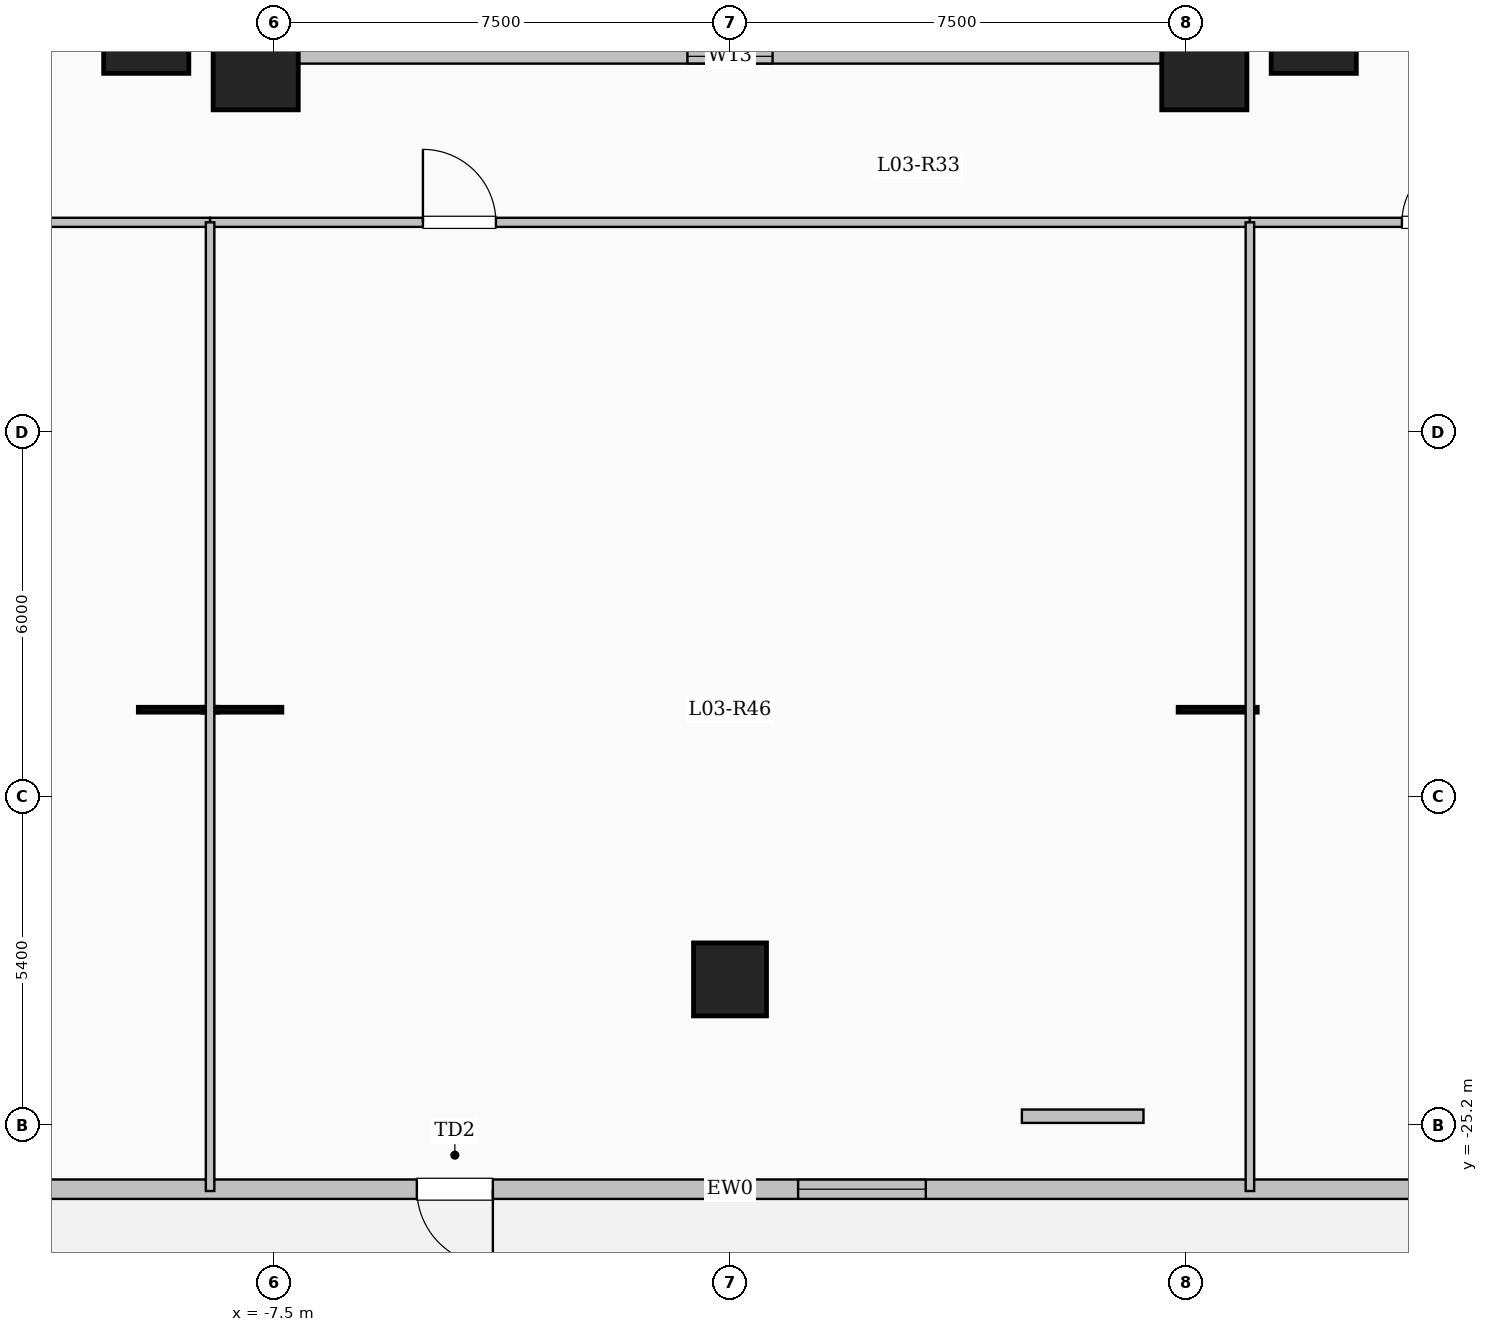
"""IFC4 building model, lengths in metres.
Left out: names, types, materials, properties, quantities, classifications, styles, units other than length and angle.
Written with IfcOpenShell. Run it as: python <this file> out.ifc"""

import sys

from ifc_helpers import new_model, si_unit, direction, frame, frame_2d, origin, origin_2d, place, context, subcontext, project, spatial, rectangle, extrude, element, fill, save


model = new_model("IFC4")
c1 = context("Model", 3, precision=1e-05, world=origin(), true_north=direction((0.0, 1.0)))
c2 = subcontext(c1, "Body", "Model", "MODEL_VIEW")
j1 = project(units=[si_unit("LENGTHUNIT", "METRE"), si_unit("PLANEANGLEUNIT", "RADIAN")], contexts=[c1])
p1 = place(None, origin())
s1 = spatial("IfcSite", under=j1, at=p1, CompositionType="ELEMENT")
p2 = place(p1, origin())
s2 = spatial("IfcBuilding", under=s1, at=p2, CompositionType="ELEMENT")
p3 = place(p2, frame((0.0, 0.0, 14.4)))
s3 = spatial("IfcBuildingStorey", under=s2, at=p3, CompositionType="ELEMENT", Elevation=14.4)
for number, where, z_axis, x_axis in (
    (1, (-7.8, -7.8, 0.0), (0.0, 0.0, 1.0), (1.0, 0.0, 0.0)),
    (2, (7.8, -7.8, 0.0), (0.0, 0.0, 1.0), (1.0, 0.0, 0.0)),
    (3, (-9.6, -7.2, 0.0), (0.0, 0.0, 1.0), (1.0, 0.0, 0.0)),
    (4, (9.6, -7.2, 0.0), (0.0, 0.0, 1.0), (1.0, 0.0, 0.0)),
):
    element("IfcColumn", number, at=place(p3, frame(where, z_axis=z_axis, x_axis=x_axis)), inside=s3, PredefinedType="COLUMN", context=c2, shape_type="SweptSolid", body=[
        extrude(rectangle(XDim=1.4, YDim=1.4, at=origin_2d()), origin(), (0.0, 0.0, 1.0), 4.5),
    ])
p4 = place(p3, frame((0.0, -22.8, 0.0), z_axis=(0.0, 0.0, 1.0), x_axis=(1.0, 0.0, 0.0)))
e5 = element("IfcColumn", 5, at=p4, inside=s3, PredefinedType="COLUMN", context=c2, shape_type="SweptSolid", body=[
    extrude(rectangle(XDim=1.2, YDim=1.2, at=origin_2d()), origin(), (0.0, 0.0, 1.0), 4.5),
])
p5 = place(p3, frame((-7.62, -7.62, 0.0), z_axis=(0.0, 0.0, 1.0), x_axis=(1.0, 0.0, 0.0)))
e6 = element("IfcWall", 6, at=p5, inside=s3, PredefinedType="SOLIDWALL", context=c2, shape_type="SweptSolid", body=[
    extrude(rectangle(XDim=15.24, YDim=0.24, at=frame_2d((7.62, 0.0))), origin(), (0.0, 0.0, 1.0), 4.2),
])
p6 = place(p5, frame((6.92, 0.0, 0.95)))
e7 = element("IfcOpeningElement", 7, at=p6, cuts=e6, PredefinedType="OPENING", context=c2, shape_type="SweptSolid", body=[
    extrude(rectangle(XDim=1.4, YDim=1.5, at=frame_2d((0.7, 0.75))), frame((0.0, 0.13, 0.0), z_axis=(0.0, -1.0, 0.0), x_axis=(1.0, 0.0, 0.0)), (0.0, 0.0, 1.0), 0.26),
])
p7 = place(p3, frame((7.62, -7.62, 0.0), z_axis=(0.0, 0.0, 1.0), x_axis=(0.0, 1.0, 0.0)))
e8 = element("IfcWall", 8, at=p7, inside=s3, PredefinedType="SOLIDWALL", context=c2, shape_type="SweptSolid", body=[
    extrude(rectangle(XDim=15.24, YDim=0.24, at=frame_2d((7.62, 0.0))), origin(), (0.0, 0.0, 1.0), 4.2),
])
p8 = place(p7, frame((6.92, 0.0, 0.95)))
e9 = element("IfcOpeningElement", 9, at=p8, cuts=e8, PredefinedType="OPENING", context=c2, shape_type="SweptSolid", body=[
    extrude(rectangle(XDim=1.4, YDim=1.5, at=frame_2d((0.7, 0.75))), frame((0.0, 0.13, 0.0), z_axis=(0.0, -1.0, 0.0), x_axis=(1.0, 0.0, 0.0)), (0.0, 0.0, 1.0), 0.26),
])
p9 = place(p3, frame((-7.62, 7.62, 0.0), z_axis=(0.0, 0.0, 1.0), x_axis=(0.0, -1.0, 0.0)))
e10 = element("IfcWall", 10, at=p9, inside=s3, PredefinedType="SOLIDWALL", context=c2, shape_type="SweptSolid", body=[
    extrude(rectangle(XDim=15.24, YDim=0.24, at=frame_2d((7.62, 0.0))), origin(), (0.0, 0.0, 1.0), 4.2),
])
p10 = place(p9, frame((6.92, 0.0, 0.95)))
e11 = element("IfcOpeningElement", 11, at=p10, cuts=e10, PredefinedType="OPENING", context=c2, shape_type="SweptSolid", body=[
    extrude(rectangle(XDim=1.4, YDim=1.5, at=frame_2d((0.7, 0.75))), frame((0.0, 0.13, 0.0), z_axis=(0.0, -1.0, 0.0), x_axis=(1.0, 0.0, 0.0)), (0.0, 0.0, 1.0), 0.26),
])
p11 = place(p3, frame((28.85, -26.25, 0.0), z_axis=(0.0, 0.0, 1.0), x_axis=(-1.0, 0.0, 0.0)))
e12 = element("IfcWall", 12, at=p11, inside=s3, PredefinedType="SOLIDWALL", context=c2, shape_type="SweptSolid", body=[
    extrude(rectangle(XDim=57.7, YDim=0.32, at=frame_2d((28.85, 0.0))), origin(), (0.0, 0.0, 1.0), 4.2),
])
p12 = place(p11, frame((32.75, 0.0, 0.0)))
e13 = element("IfcOpeningElement", 13, at=p12, cuts=e12, PredefinedType="OPENING", context=c2, shape_type="SweptSolid", body=[
    extrude(rectangle(XDim=1.25, YDim=2.25, at=frame_2d((0.625, 1.125))), frame((0.0, 0.17, 0.0), z_axis=(0.0, -1.0, 0.0), x_axis=(1.0, 0.0, 0.0)), (0.0, 0.0, 1.0), 0.34),
])
p13 = place(p11, frame((13.775, 0.0, 0.9)))
e14 = element("IfcOpeningElement", 14, at=p13, cuts=e12, PredefinedType="OPENING", context=c2, shape_type="SweptSolid", body=[
    extrude(rectangle(XDim=2.1, YDim=2.0, at=frame_2d((1.05, 1.0))), frame((0.0, 0.17, 0.0), z_axis=(0.0, -1.0, 0.0), x_axis=(1.0, 0.0, 0.0)), (0.0, 0.0, 1.0), 0.34),
])
p14 = place(p11, frame((25.63, 0.0, 0.9)))
e15 = element("IfcOpeningElement", 15, at=p14, cuts=e12, PredefinedType="OPENING", context=c2, shape_type="SweptSolid", body=[
    extrude(rectangle(XDim=2.1, YDim=2.0, at=frame_2d((1.05, 1.0))), frame((0.0, 0.17, 0.0), z_axis=(0.0, -1.0, 0.0), x_axis=(1.0, 0.0, 0.0)), (0.0, 0.0, 1.0), 0.34),
])
p15 = place(p11, frame((46.55, 0.0, 0.9)))
e16 = element("IfcOpeningElement", 16, at=p15, cuts=e12, PredefinedType="OPENING", context=c2, shape_type="SweptSolid", body=[
    extrude(rectangle(XDim=2.1, YDim=2.0, at=frame_2d((1.05, 1.0))), frame((0.0, 0.17, 0.0), z_axis=(0.0, -1.0, 0.0), x_axis=(1.0, 0.0, 0.0)), (0.0, 0.0, 1.0), 0.34),
])
p16 = place(p3, frame((4.8, -25.05, 0.0), z_axis=(0.0, 0.0, 1.0), x_axis=(1.0, 0.0, 0.0)))
e17 = element("IfcWall", 17, at=p16, inside=s3, PredefinedType="PARAPET", context=c2, shape_type="SweptSolid", body=[
    extrude(rectangle(XDim=2.0, YDim=0.22, at=frame_2d((1.0, 0.0))), origin(), (0.0, 0.0, 1.0), 0.85),
])
p17 = place(p3, frame((-28.88, -10.35, 0.0), z_axis=(0.0, 0.0, 1.0), x_axis=(1.0, 0.0, 0.0)))
e18 = element("IfcWall", 18, at=p17, inside=s3, PredefinedType="PARTITIONING", context=c2, shape_type="SweptSolid", body=[
    extrude(rectangle(XDim=20.33, YDim=0.15, at=frame_2d((10.165, 0.0))), origin(), (0.0, 0.0, 1.0), 4.2),
])
p18 = place(p17, frame((3.5, 0.0, 0.0)))
e19 = element("IfcOpeningElement", 19, at=p18, cuts=e18, PredefinedType="OPENING", context=c2, shape_type="SweptSolid", body=[
    extrude(rectangle(XDim=1.2, YDim=2.15, at=frame_2d((0.6, 1.075))), frame((0.0, 0.085, 0.0), z_axis=(0.0, -1.0, 0.0), x_axis=(1.0, 0.0, 0.0)), (0.0, 0.0, 1.0), 0.17),
])
p19 = place(p3, frame((-8.55, -10.35, 0.0), z_axis=(0.0, 0.0, 1.0), x_axis=(1.0, 0.0, 0.0)))
e20 = element("IfcWall", 20, at=p19, inside=s3, PredefinedType="PARTITIONING", context=c2, shape_type="SweptSolid", body=[
    extrude(rectangle(XDim=17.1, YDim=0.15, at=frame_2d((8.55, 0.0))), origin(), (0.0, 0.0, 1.0), 4.2),
])
p20 = place(p19, frame((3.5, 0.0, 0.0)))
e21 = element("IfcOpeningElement", 21, at=p20, cuts=e20, PredefinedType="OPENING", context=c2, shape_type="SweptSolid", body=[
    extrude(rectangle(XDim=1.2, YDim=2.15, at=frame_2d((0.6, 1.075))), frame((0.0, 0.085, 0.0), z_axis=(0.0, -1.0, 0.0), x_axis=(1.0, 0.0, 0.0)), (0.0, 0.0, 1.0), 0.17),
])
p21 = place(p3, frame((8.55, -10.35, 0.0), z_axis=(0.0, 0.0, 1.0), x_axis=(1.0, 0.0, 0.0)))
e22 = element("IfcWall", 22, at=p21, inside=s3, PredefinedType="PARTITIONING", context=c2, shape_type="SweptSolid", body=[
    extrude(rectangle(XDim=20.33, YDim=0.15, at=frame_2d((10.165, 0.0))), origin(), (0.0, 0.0, 1.0), 4.2),
])
p22 = place(p21, frame((2.5, 0.0, 0.0)))
e23 = element("IfcOpeningElement", 23, at=p22, cuts=e22, PredefinedType="OPENING", context=c2, shape_type="SweptSolid", body=[
    extrude(rectangle(XDim=1.08, YDim=2.15, at=frame_2d((0.54, 1.075))), frame((0.0, 0.085, 0.0), z_axis=(0.0, -1.0, 0.0), x_axis=(1.0, 0.0, 0.0)), (0.0, 0.0, 1.0), 0.17),
])
for number, where, z_axis, x_axis in (
    (24, (-8.55, -26.28, 0.0), (0.0, 0.0, 1.0), (0.0, 1.0, 0.0)),
    (25, (8.55, -26.28, 0.0), (0.0, 0.0, 1.0), (0.0, 1.0, 0.0)),
):
    element("IfcWall", number, at=place(p3, frame(where, z_axis=z_axis, x_axis=x_axis)), inside=s3, PredefinedType="PARTITIONING", context=c2, shape_type="SweptSolid", body=[
        extrude(rectangle(XDim=15.93, YDim=0.14, at=frame_2d((7.965, 0.0))), origin(), (0.0, 0.0, 1.0), 4.2),
    ])
p23 = place(p6, origin())
e26 = element("IfcWindow", 26, at=p23, inside=s3, PartitioningType="SINGLE_PANEL", PredefinedType="WINDOW", context=c2, shape_type="SweptSolid", body=[
    extrude(rectangle(XDim=1.4, YDim=1.5, at=frame_2d((0.7, 0.75))), frame((0.0, 0.03, 0.0), z_axis=(0.0, -1.0, 0.0), x_axis=(1.0, 0.0, 0.0)), (0.0, 0.0, 1.0), 0.06),
])
fill(e7, e26)
p24 = place(p12, origin())
e27 = element("IfcDoor", 27, at=p24, inside=s3, OperationType="SINGLE_SWING_LEFT", PredefinedType="DOOR", context=c2, shape_type="SweptSolid", body=[
    extrude(rectangle(XDim=1.25, YDim=2.25, at=frame_2d((0.625, 1.125))), frame((0.0, 0.025, 0.0), z_axis=(0.0, -1.0, 0.0), x_axis=(1.0, 0.0, 0.0)), (0.0, 0.0, 1.0), 0.05),
])
fill(e13, e27)
p25 = place(p14, origin())
e28 = element("IfcWindow", 28, at=p25, inside=s3, PartitioningType="SINGLE_PANEL", PredefinedType="WINDOW", context=c2, shape_type="SweptSolid", body=[
    extrude(rectangle(XDim=2.1, YDim=2.0, at=frame_2d((1.05, 1.0))), frame((0.0, 0.03, 0.0), z_axis=(0.0, -1.0, 0.0), x_axis=(1.0, 0.0, 0.0)), (0.0, 0.0, 1.0), 0.06),
])
fill(e15, e28)
p26 = place(p20, origin())
e29 = element("IfcDoor", 29, at=p26, inside=s3, OperationType="SINGLE_SWING_LEFT", PredefinedType="DOOR", context=c2, shape_type="SweptSolid", body=[
    extrude(rectangle(XDim=1.2, YDim=2.15, at=frame_2d((0.6, 1.075))), frame((0.0, 0.025, 0.0), z_axis=(0.0, -1.0, 0.0), x_axis=(1.0, 0.0, 0.0)), (0.0, 0.0, 1.0), 0.05),
])
fill(e21, e29)
p27 = place(p22, origin())
e30 = element("IfcDoor", 30, at=p27, inside=s3, OperationType="SINGLE_SWING_RIGHT", PredefinedType="DOOR", context=c2, shape_type="SweptSolid", body=[
    extrude(rectangle(XDim=1.08, YDim=2.15, at=frame_2d((0.54, 1.075))), frame((0.0, 0.025, 0.0), z_axis=(0.0, -1.0, 0.0), x_axis=(1.0, 0.0, 0.0)), (0.0, 0.0, 1.0), 0.05),
])
fill(e23, e30)
save(model, sys.argv[1])
